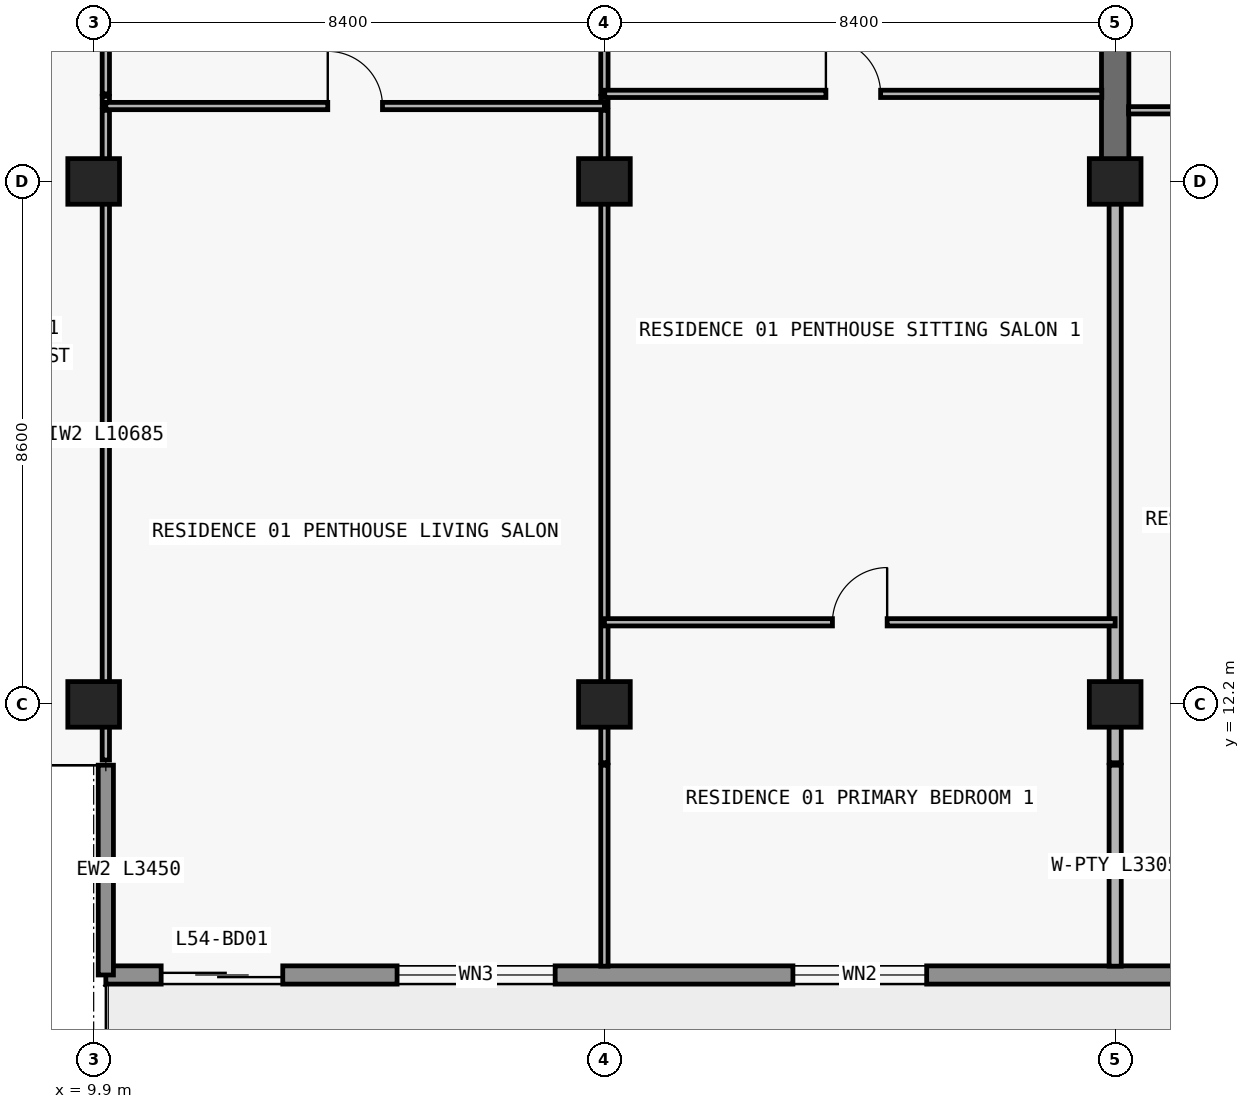
"""IFC4 building model, lengths in metres.
Left out: names, types, materials, properties, quantities, classifications, styles, units other than length and angle.
Written with IfcOpenShell. Run it as: python <this file> out.ifc"""

import sys

from ifc_helpers import new_model, si_unit, direction, frame, frame_2d, origin, origin_2d, place, context, subcontext, project, spatial, rectangle, extrude, element, fill, save


model = new_model("IFC4")
c1 = context("Model", 3, precision=1e-05, world=origin(), true_north=direction((0.0, 1.0)))
c2 = subcontext(c1, "Body", "Model", "MODEL_VIEW")
j1 = project(units=[si_unit("LENGTHUNIT", "METRE"), si_unit("PLANEANGLEUNIT", "RADIAN")], contexts=[c1])
p1 = place(None, origin())
s1 = spatial("IfcSite", under=j1, at=p1, CompositionType="ELEMENT")
p2 = place(p1, origin())
s2 = spatial("IfcBuilding", under=s1, at=p2, CompositionType="ELEMENT")
p3 = place(p2, frame((0.0, 0.0, 195.0)))
s3 = spatial("IfcBuildingStorey", under=s2, at=p3, CompositionType="ELEMENT", Elevation=195.0)
for number, where, z_axis, x_axis in (
    (1, (9.9, 12.2, 0.0), (0.0, 0.0, 1.0), (1.0, 0.0, 0.0)),
    (2, (18.3, 12.2, 0.0), (0.0, 0.0, 1.0), (1.0, 0.0, 0.0)),
    (3, (26.7, 12.2, 0.0), (0.0, 0.0, 1.0), (1.0, 0.0, 0.0)),
    (4, (9.9, 20.8, 0.0), (0.0, 0.0, 1.0), (1.0, 0.0, 0.0)),
    (5, (18.3, 20.8, 0.0), (0.0, 0.0, 1.0), (1.0, 0.0, 0.0)),
    (6, (26.7, 20.8, 0.0), (0.0, 0.0, 1.0), (1.0, 0.0, 0.0)),
):
    element("IfcColumn", number, at=place(p3, frame(where, z_axis=z_axis, x_axis=x_axis)), inside=s3, PredefinedType="COLUMN", context=c2, shape_type="SweptSolid", body=[
        extrude(rectangle(XDim=0.85, YDim=0.75, at=origin_2d()), origin(), (0.0, 0.0, 1.0), 3.05),
    ])
p4 = place(p3, frame((26.7, 20.8, 0.0), z_axis=(0.0, 0.0, 1.0), x_axis=(0.0, 1.0, 0.0)))
e7 = element("IfcWall", 7, at=p4, inside=s3, PredefinedType="SHEAR", context=c2, shape_type="SweptSolid", body=[
    extrude(rectangle(XDim=8.6, YDim=0.45, at=frame_2d((4.3, 0.0))), origin(), (0.0, 0.0, 1.0), 3.05),
])
p5 = place(p3, frame((67.7, 7.75, 0.0), z_axis=(0.0, 0.0, 1.0), x_axis=(-1.0, 0.0, 0.0)))
e8 = element("IfcWall", 8, at=p5, inside=s3, PredefinedType="STANDARD", context=c2, shape_type="SweptSolid", body=[
    extrude(rectangle(XDim=57.6, YDim=0.3, at=frame_2d((28.8, 0.0))), origin(), (0.0, 0.0, 1.0), 3.05),
])
p6 = place(p5, frame((54.69, 0.0, 0.0)))
e9 = element("IfcOpeningElement", 9, at=p6, cuts=e8, PredefinedType="OPENING", context=c2, shape_type="SweptSolid", body=[
    extrude(rectangle(XDim=2.0, YDim=2.3, at=frame_2d((1.0, 1.15))), frame((0.0, 0.16, 0.0), z_axis=(0.0, -1.0, 0.0), x_axis=(1.0, 0.0, 0.0)), (0.0, 0.0, 1.0), 0.32),
])
p7 = place(p5, frame((50.21, 0.0, 0.65)))
e10 = element("IfcOpeningElement", 10, at=p7, cuts=e8, PredefinedType="OPENING", context=c2, shape_type="SweptSolid", body=[
    extrude(rectangle(XDim=2.6, YDim=1.85, at=frame_2d((1.3, 0.925))), frame((0.0, 0.16, 0.0), z_axis=(0.0, -1.0, 0.0), x_axis=(1.0, 0.0, 0.0)), (0.0, 0.0, 1.0), 0.32),
])
p8 = place(p5, frame((44.1, 0.0, 0.85)))
e11 = element("IfcOpeningElement", 11, at=p8, cuts=e8, PredefinedType="OPENING", context=c2, shape_type="SweptSolid", body=[
    extrude(rectangle(XDim=2.2, YDim=1.55, at=frame_2d((1.1, 0.775))), frame((0.0, 0.16, 0.0), z_axis=(0.0, -1.0, 0.0), x_axis=(1.0, 0.0, 0.0)), (0.0, 0.0, 1.0), 0.32),
])
p9 = place(p5, frame((37.69, 0.0, 0.0)))
e12 = element("IfcOpeningElement", 12, at=p9, cuts=e8, PredefinedType="OPENING", context=c2, shape_type="SweptSolid", body=[
    extrude(rectangle(XDim=2.0, YDim=2.3, at=frame_2d((1.0, 1.15))), frame((0.0, 0.16, 0.0), z_axis=(0.0, -1.0, 0.0), x_axis=(1.0, 0.0, 0.0)), (0.0, 0.0, 1.0), 0.32),
])
p10 = place(p5, frame((33.59, 0.0, 0.85)))
e13 = element("IfcOpeningElement", 13, at=p10, cuts=e8, PredefinedType="OPENING", context=c2, shape_type="SweptSolid", body=[
    extrude(rectangle(XDim=1.8, YDim=1.55, at=frame_2d((0.9, 0.775))), frame((0.0, 0.16, 0.0), z_axis=(0.0, -1.0, 0.0), x_axis=(1.0, 0.0, 0.0)), (0.0, 0.0, 1.0), 0.32),
])
p11 = place(p5, frame((29.69, 0.0, 0.0)))
e14 = element("IfcOpeningElement", 14, at=p11, cuts=e8, PredefinedType="OPENING", context=c2, shape_type="SweptSolid", body=[
    extrude(rectangle(XDim=2.0, YDim=2.3, at=frame_2d((1.0, 1.15))), frame((0.0, 0.16, 0.0), z_axis=(0.0, -1.0, 0.0), x_axis=(1.0, 0.0, 0.0)), (0.0, 0.0, 1.0), 0.32),
])
p12 = place(p5, frame((25.81, 0.0, 0.65)))
e15 = element("IfcOpeningElement", 15, at=p12, cuts=e8, PredefinedType="OPENING", context=c2, shape_type="SweptSolid", body=[
    extrude(rectangle(XDim=2.6, YDim=1.85, at=frame_2d((1.3, 0.925))), frame((0.0, 0.16, 0.0), z_axis=(0.0, -1.0, 0.0), x_axis=(1.0, 0.0, 0.0)), (0.0, 0.0, 1.0), 0.32),
])
p13 = place(p5, frame((19.7, 0.0, 0.85)))
e16 = element("IfcOpeningElement", 16, at=p13, cuts=e8, PredefinedType="OPENING", context=c2, shape_type="SweptSolid", body=[
    extrude(rectangle(XDim=2.2, YDim=1.55, at=frame_2d((1.1, 0.775))), frame((0.0, 0.16, 0.0), z_axis=(0.0, -1.0, 0.0), x_axis=(1.0, 0.0, 0.0)), (0.0, 0.0, 1.0), 0.32),
])
p14 = place(p5, frame((13.29, 0.0, 0.0)))
e17 = element("IfcOpeningElement", 17, at=p14, cuts=e8, PredefinedType="OPENING", context=c2, shape_type="SweptSolid", body=[
    extrude(rectangle(XDim=2.0, YDim=2.3, at=frame_2d((1.0, 1.15))), frame((0.0, 0.16, 0.0), z_axis=(0.0, -1.0, 0.0), x_axis=(1.0, 0.0, 0.0)), (0.0, 0.0, 1.0), 0.32),
])
p15 = place(p5, frame((9.19, 0.0, 0.85)))
e18 = element("IfcOpeningElement", 18, at=p15, cuts=e8, PredefinedType="OPENING", context=c2, shape_type="SweptSolid", body=[
    extrude(rectangle(XDim=1.8, YDim=1.55, at=frame_2d((0.9, 0.775))), frame((0.0, 0.16, 0.0), z_axis=(0.0, -1.0, 0.0), x_axis=(1.0, 0.0, 0.0)), (0.0, 0.0, 1.0), 0.32),
])
p16 = place(p5, frame((5.273, 0.0, 0.0)))
e19 = element("IfcOpeningElement", 19, at=p16, cuts=e8, PredefinedType="OPENING", context=c2, shape_type="SweptSolid", body=[
    extrude(rectangle(XDim=2.0, YDim=2.3, at=frame_2d((1.0, 1.15))), frame((0.0, 0.16, 0.0), z_axis=(0.0, -1.0, 0.0), x_axis=(1.0, 0.0, 0.0)), (0.0, 0.0, 1.0), 0.32),
])
p17 = place(p5, frame((1.073, 0.0, 0.85)))
e20 = element("IfcOpeningElement", 20, at=p17, cuts=e8, PredefinedType="OPENING", context=c2, shape_type="SweptSolid", body=[
    extrude(rectangle(XDim=2.2, YDim=1.55, at=frame_2d((1.1, 0.775))), frame((0.0, 0.16, 0.0), z_axis=(0.0, -1.0, 0.0), x_axis=(1.0, 0.0, 0.0)), (0.0, 0.0, 1.0), 0.32),
])
p18 = place(p3, frame((10.1, 11.2, 0.0), z_axis=(0.0, 0.0, 1.0), x_axis=(0.0, -1.0, 0.0)))
e21 = element("IfcWall", 21, at=p18, inside=s3, PredefinedType="ELEMENTEDWALL", context=c2, shape_type="SweptSolid", body=[
    extrude(rectangle(XDim=3.45, YDim=0.25, at=frame_2d((1.725, 0.0))), origin(), (0.0, 0.0, 1.0), 3.05),
])
p19 = place(p3, frame((10.1, 11.285, 0.0), z_axis=(0.0, 0.0, 1.0), x_axis=(0.0, 1.0, 0.0)))
e22 = element("IfcWall", 22, at=p19, inside=s3, PredefinedType="PARTITIONING", context=c2, shape_type="SweptSolid", body=[
    extrude(rectangle(XDim=10.685, YDim=0.12, at=frame_2d((5.343, 0.0))), origin(), (0.0, 0.0, 1.0), 2.263),
])
p20 = place(p3, frame((10.1, 22.04, 0.0), z_axis=(0.0, 0.0, 1.0), x_axis=(0.0, 1.0, 0.0)))
e23 = element("IfcWall", 23, at=p20, inside=s3, PredefinedType="PARTITIONING", context=c2, shape_type="SweptSolid", body=[
    extrude(rectangle(XDim=0.16, YDim=0.12, at=frame_2d((0.08, 0.0))), origin(), (0.0, 0.0, 1.0), 2.263),
])
p21 = place(p3, frame((10.1, 22.24, 0.0), z_axis=(0.0, 0.0, 1.0), x_axis=(0.0, 1.0, 0.0)))
e24 = element("IfcWall", 24, at=p21, inside=s3, PredefinedType="PARTITIONING", context=c2, shape_type="SweptSolid", body=[
    extrude(rectangle(XDim=4.36, YDim=0.12, at=frame_2d((2.18, 0.0))), origin(), (0.0, 0.0, 1.0), 2.263),
])
p22 = place(p21, frame((1.73, 0.0, 0.0)))
e25 = element("IfcOpeningElement", 25, at=p22, cuts=e24, PredefinedType="OPENING", context=c2, shape_type="SweptSolid", body=[
    extrude(rectangle(XDim=0.9, YDim=2.15, at=frame_2d((0.45, 1.075))), frame((0.0, 0.07, 0.0), z_axis=(0.0, -1.0, 0.0), x_axis=(1.0, 0.0, 0.0)), (0.0, 0.0, 1.0), 0.14),
])
p23 = place(p3, frame((18.3, 7.895, 0.0), z_axis=(0.0, 0.0, 1.0), x_axis=(0.0, 1.0, 0.0)))
e26 = element("IfcWall", 26, at=p23, inside=s3, PredefinedType="PARTITIONING", context=c2, shape_type="SweptSolid", body=[
    extrude(rectangle(XDim=3.305, YDim=0.12, at=frame_2d((1.652, 0.0))), origin(), (0.0, 0.0, 1.0), 3.05),
])
p24 = place(p3, frame((18.3, 11.24, 0.0), z_axis=(0.0, 0.0, 1.0), x_axis=(0.0, 1.0, 0.0)))
e27 = element("IfcWall", 27, at=p24, inside=s3, PredefinedType="PARTITIONING", context=c2, shape_type="SweptSolid", body=[
    extrude(rectangle(XDim=10.73, YDim=0.12, at=frame_2d((5.365, 0.0))), origin(), (0.0, 0.0, 1.0), 2.263),
])
p25 = place(p3, frame((18.3, 22.04, 0.0), z_axis=(0.0, 0.0, 1.0), x_axis=(0.0, 1.0, 0.0)))
e28 = element("IfcWall", 28, at=p25, inside=s3, PredefinedType="PARTITIONING", context=c2, shape_type="SweptSolid", body=[
    extrude(rectangle(XDim=0.16, YDim=0.12, at=frame_2d((0.08, 0.0))), origin(), (0.0, 0.0, 1.0), 2.263),
])
p26 = place(p3, frame((18.3, 22.24, 0.0), z_axis=(0.0, 0.0, 1.0), x_axis=(0.0, 1.0, 0.0)))
e29 = element("IfcWall", 29, at=p26, inside=s3, PredefinedType="PARTITIONING", context=c2, shape_type="SweptSolid", body=[
    extrude(rectangle(XDim=4.36, YDim=0.12, at=frame_2d((2.18, 0.0))), origin(), (0.0, 0.0, 1.0), 2.263),
])
p27 = place(p26, frame((1.73, 0.0, 0.0)))
e30 = element("IfcOpeningElement", 30, at=p27, cuts=e29, PredefinedType="OPENING", context=c2, shape_type="SweptSolid", body=[
    extrude(rectangle(XDim=0.9, YDim=2.15, at=frame_2d((0.45, 1.075))), frame((0.0, 0.07, 0.0), z_axis=(0.0, -1.0, 0.0), x_axis=(1.0, 0.0, 0.0)), (0.0, 0.0, 1.0), 0.14),
])
p28 = place(p3, frame((26.7, 7.895, 0.0), z_axis=(0.0, 0.0, 1.0), x_axis=(0.0, 1.0, 0.0)))
e31 = element("IfcWall", 31, at=p28, inside=s3, PredefinedType="PARTITIONING", context=c2, shape_type="SweptSolid", body=[
    extrude(rectangle(XDim=3.305, YDim=0.2, at=frame_2d((1.652, 0.0))), origin(), (0.0, 0.0, 1.0), 3.05),
])
p29 = place(p3, frame((26.7, 11.24, 0.0), z_axis=(0.0, 0.0, 1.0), x_axis=(0.0, 1.0, 0.0)))
e32 = element("IfcWall", 32, at=p29, inside=s3, PredefinedType="PARTITIONING", context=c2, shape_type="SweptSolid", body=[
    extrude(rectangle(XDim=9.555, YDim=0.2, at=frame_2d((4.777, 0.0))), origin(), (0.0, 0.0, 1.0), 2.263),
])
p30 = place(p3, frame((18.3, 13.55, 0.0), z_axis=(0.0, 0.0, 1.0), x_axis=(1.0, 0.0, 0.0)))
e33 = element("IfcWall", 33, at=p30, inside=s3, PredefinedType="PARTITIONING", context=c2, shape_type="SweptSolid", body=[
    extrude(rectangle(XDim=8.4, YDim=0.12, at=frame_2d((4.2, 0.0))), origin(), (0.0, 0.0, 1.0), 3.05),
])
p31 = place(p30, frame((3.75, 0.0, 0.0)))
e34 = element("IfcOpeningElement", 34, at=p31, cuts=e33, PredefinedType="OPENING", context=c2, shape_type="SweptSolid", body=[
    extrude(rectangle(XDim=0.9, YDim=2.15, at=frame_2d((0.45, 1.075))), frame((0.0, 0.07, 0.0), z_axis=(0.0, -1.0, 0.0), x_axis=(1.0, 0.0, 0.0)), (0.0, 0.0, 1.0), 0.14),
])
p32 = place(p3, frame((26.92, 21.97, 0.0), z_axis=(0.0, 0.0, 1.0), x_axis=(1.0, 0.0, 0.0)))
e35 = element("IfcWall", 35, at=p32, inside=s3, PredefinedType="PARTITIONING", context=c2, shape_type="SweptSolid", body=[
    extrude(rectangle(XDim=8.18, YDim=0.12, at=frame_2d((4.09, 0.0))), origin(), (0.0, 0.0, 1.0), 3.05),
])
p33 = place(p32, frame((1.75, 0.0, 0.0)))
e36 = element("IfcOpeningElement", 36, at=p33, cuts=e35, PredefinedType="OPENING", context=c2, shape_type="SweptSolid", body=[
    extrude(rectangle(XDim=0.9, YDim=2.15, at=frame_2d((0.45, 1.075))), frame((0.0, 0.07, 0.0), z_axis=(0.0, -1.0, 0.0), x_axis=(1.0, 0.0, 0.0)), (0.0, 0.0, 1.0), 0.14),
])
p34 = place(p32, frame((5.923, 0.0, 0.0)))
e37 = element("IfcOpeningElement", 37, at=p34, cuts=e35, PredefinedType="OPENING", context=c2, shape_type="SweptSolid", body=[
    extrude(rectangle(XDim=0.9, YDim=2.15, at=frame_2d((0.45, 1.075))), frame((0.0, 0.07, 0.0), z_axis=(0.0, -1.0, 0.0), x_axis=(1.0, 0.0, 0.0)), (0.0, 0.0, 1.0), 0.14),
])
p35 = place(p3, frame((10.1, 22.04, 0.0), z_axis=(0.0, 0.0, 1.0), x_axis=(1.0, 0.0, 0.0)))
e38 = element("IfcWall", 38, at=p35, inside=s3, PredefinedType="PARTITIONING", context=c2, shape_type="SweptSolid", body=[
    extrude(rectangle(XDim=8.2, YDim=0.12, at=frame_2d((4.1, 0.0))), origin(), (0.0, 0.0, 1.0), 3.05),
])
p36 = place(p35, frame((3.65, 0.0, 0.0)))
e39 = element("IfcOpeningElement", 39, at=p36, cuts=e38, PredefinedType="OPENING", context=c2, shape_type="SweptSolid", body=[
    extrude(rectangle(XDim=0.9, YDim=2.15, at=frame_2d((0.45, 1.075))), frame((0.0, 0.07, 0.0), z_axis=(0.0, -1.0, 0.0), x_axis=(1.0, 0.0, 0.0)), (0.0, 0.0, 1.0), 0.14),
])
p37 = place(p3, frame((18.305, 22.24, 0.0), z_axis=(0.0, 0.0, 1.0), x_axis=(1.0, 0.0, 0.0)))
e40 = element("IfcWall", 40, at=p37, inside=s3, PredefinedType="PARTITIONING", context=c2, shape_type="SweptSolid", body=[
    extrude(rectangle(XDim=8.175, YDim=0.12, at=frame_2d((4.087, 0.0))), origin(), (0.0, 0.0, 1.0), 3.05),
])
p38 = place(p37, frame((3.637, 0.0, 0.0)))
e41 = element("IfcOpeningElement", 41, at=p38, cuts=e40, PredefinedType="OPENING", context=c2, shape_type="SweptSolid", body=[
    extrude(rectangle(XDim=0.9, YDim=2.15, at=frame_2d((0.45, 1.075))), frame((0.0, 0.07, 0.0), z_axis=(0.0, -1.0, 0.0), x_axis=(1.0, 0.0, 0.0)), (0.0, 0.0, 1.0), 0.14),
])
p39 = place(p6, origin())
e42 = element("IfcDoor", 42, at=p39, inside=s3, OperationType="DOUBLE_DOOR_SLIDING", PredefinedType="DOOR", context=c2, shape_type="SweptSolid", body=[
    extrude(rectangle(XDim=2.0, YDim=2.3, at=frame_2d((1.0, 1.15))), frame((0.0, 0.025, 0.0), z_axis=(0.0, -1.0, 0.0), x_axis=(1.0, 0.0, 0.0)), (0.0, 0.0, 1.0), 0.05),
])
fill(e9, e42)
p40 = place(p7, origin())
e43 = element("IfcWindow", 43, at=p40, inside=s3, PartitioningType="SINGLE_PANEL", PredefinedType="WINDOW", context=c2, shape_type="SweptSolid", body=[
    extrude(rectangle(XDim=2.6, YDim=1.85, at=frame_2d((1.3, 0.925))), frame((0.0, 0.03, 0.0), z_axis=(0.0, -1.0, 0.0), x_axis=(1.0, 0.0, 0.0)), (0.0, 0.0, 1.0), 0.06),
])
fill(e10, e43)
p41 = place(p8, origin())
e44 = element("IfcWindow", 44, at=p41, inside=s3, PartitioningType="SINGLE_PANEL", PredefinedType="WINDOW", context=c2, shape_type="SweptSolid", body=[
    extrude(rectangle(XDim=2.2, YDim=1.55, at=frame_2d((1.1, 0.775))), frame((0.0, 0.03, 0.0), z_axis=(0.0, -1.0, 0.0), x_axis=(1.0, 0.0, 0.0)), (0.0, 0.0, 1.0), 0.06),
])
fill(e11, e44)
p42 = place(p36, origin())
e45 = element("IfcDoor", 45, at=p42, inside=s3, OperationType="SINGLE_SWING_LEFT", PredefinedType="DOOR", context=c2, shape_type="SweptSolid", body=[
    extrude(rectangle(XDim=0.9, YDim=2.15, at=frame_2d((0.45, 1.075))), frame((0.0, 0.025, 0.0), z_axis=(0.0, -1.0, 0.0), x_axis=(1.0, 0.0, 0.0)), (0.0, 0.0, 1.0), 0.05),
])
fill(e39, e45)
p43 = place(p38, origin())
e46 = element("IfcDoor", 46, at=p43, inside=s3, OperationType="SINGLE_SWING_LEFT", PredefinedType="DOOR", context=c2, shape_type="SweptSolid", body=[
    extrude(rectangle(XDim=0.9, YDim=2.15, at=frame_2d((0.45, 1.075))), frame((0.0, 0.025, 0.0), z_axis=(0.0, -1.0, 0.0), x_axis=(1.0, 0.0, 0.0)), (0.0, 0.0, 1.0), 0.05),
])
fill(e41, e46)
p44 = place(p31, origin())
e47 = element("IfcDoor", 47, at=p44, inside=s3, OperationType="SINGLE_SWING_RIGHT", PredefinedType="DOOR", context=c2, shape_type="SweptSolid", body=[
    extrude(rectangle(XDim=0.9, YDim=2.15, at=frame_2d((0.45, 1.075))), frame((0.0, 0.025, 0.0), z_axis=(0.0, -1.0, 0.0), x_axis=(1.0, 0.0, 0.0)), (0.0, 0.0, 1.0), 0.05),
])
fill(e34, e47)
save(model, sys.argv[1])
